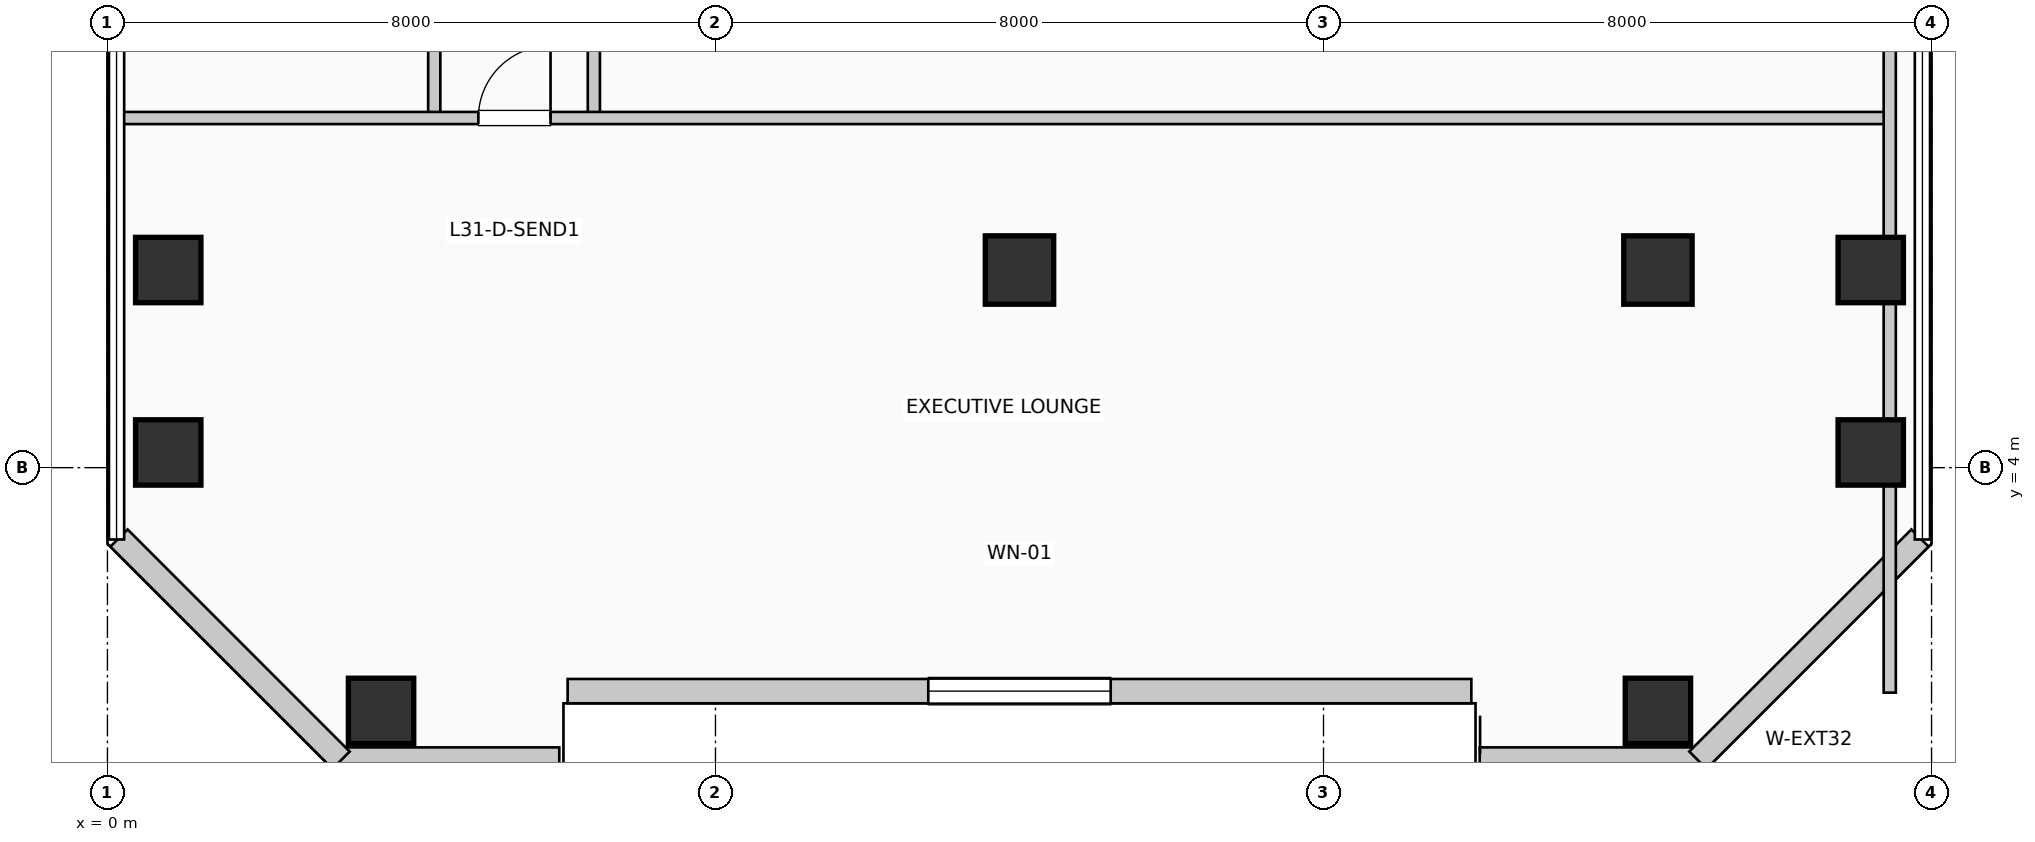
"""IFC4 building model, lengths in metres.
Left out: names, types, materials, properties, quantities, classifications, styles, units other than length and angle.
Written with IfcOpenShell. Run it as: python <this file> out.ifc"""

import sys

from ifc_helpers import new_model, si_unit, direction, frame, frame_2d, origin, origin_2d, place, context, subcontext, project, spatial, rectangle, extrude, element, fill, save


model = new_model("IFC4")
c1 = context("Model", 3, precision=1e-05, world=origin(), true_north=direction((0.0, 1.0)))
c2 = subcontext(c1, "Body", "Model", "MODEL_VIEW")
j1 = project(units=[si_unit("LENGTHUNIT", "METRE"), si_unit("PLANEANGLEUNIT", "RADIAN")], contexts=[c1])
p1 = place(None, origin())
s1 = spatial("IfcSite", under=j1, at=p1, CompositionType="ELEMENT")
p2 = place(p1, origin())
s2 = spatial("IfcBuilding", under=s1, at=p2, CompositionType="ELEMENT")
p3 = place(p2, frame((0.0, 0.0, 130.35)))
s3 = spatial("IfcBuildingStorey", under=s2, at=p3, CompositionType="ELEMENT", Elevation=130.35)
for number, where, z_axis, x_axis in (
    (1, (0.8, 4.2, 0.0), (0.0, 0.0, 1.0), (1.0, 0.0, 0.0)),
    (2, (0.8, 6.6, 0.0), (0.0, 0.0, 1.0), (1.0, 0.0, 0.0)),
    (3, (3.6, 0.8, 0.0), (0.0, 0.0, 1.0), (1.0, 0.0, 0.0)),
):
    element("IfcColumn", number, at=place(p3, frame(where, z_axis=z_axis, x_axis=x_axis)), inside=s3, PredefinedType="COLUMN", context=c2, shape_type="SweptSolid", body=[
        extrude(rectangle(XDim=0.86, YDim=0.86, at=origin_2d()), origin(), (0.0, 0.0, 1.0), 4.62),
    ])
p4 = place(p3, frame((12.0, 6.6, 0.0), z_axis=(0.0, 0.0, 1.0), x_axis=(1.0, 0.0, 0.0)))
e4 = element("IfcColumn", 4, at=p4, inside=s3, PredefinedType="COLUMN", context=c2, shape_type="SweptSolid", body=[
    extrude(rectangle(XDim=0.9, YDim=0.9, at=origin_2d()), origin(), (0.0, 0.0, 1.0), 4.62),
])
p5 = place(p3, frame((20.4, 0.8, 0.0), z_axis=(0.0, 0.0, 1.0), x_axis=(1.0, 0.0, 0.0)))
e5 = element("IfcColumn", 5, at=p5, inside=s3, PredefinedType="COLUMN", context=c2, shape_type="SweptSolid", body=[
    extrude(rectangle(XDim=0.86, YDim=0.86, at=origin_2d()), origin(), (0.0, 0.0, 1.0), 4.62),
])
p6 = place(p3, frame((20.4, 6.6, 0.0), z_axis=(0.0, 0.0, 1.0), x_axis=(1.0, 0.0, 0.0)))
e6 = element("IfcColumn", 6, at=p6, inside=s3, PredefinedType="COLUMN", context=c2, shape_type="SweptSolid", body=[
    extrude(rectangle(XDim=0.9, YDim=0.9, at=origin_2d()), origin(), (0.0, 0.0, 1.0), 4.62),
])
for number, where, z_axis, x_axis in (
    (7, (23.2, 4.2, 0.0), (0.0, 0.0, 1.0), (1.0, 0.0, 0.0)),
    (8, (23.2, 6.6, 0.0), (0.0, 0.0, 1.0), (1.0, 0.0, 0.0)),
):
    element("IfcColumn", number, at=place(p3, frame(where, z_axis=z_axis, x_axis=x_axis)), inside=s3, PredefinedType="COLUMN", context=c2, shape_type="SweptSolid", body=[
        extrude(rectangle(XDim=0.86, YDim=0.86, at=origin_2d()), origin(), (0.0, 0.0, 1.0), 4.62),
    ])
p7 = place(p3, frame((3.055, 0.16, 0.0), z_axis=(0.0, 0.0, 1.0), x_axis=(1.0, 0.0, 0.0)))
e9 = element("IfcWall", 9, at=p7, inside=s3, PredefinedType="SOLIDWALL", context=c2, shape_type="SweptSolid", body=[
    extrude(rectangle(XDim=2.89, YDim=0.32, at=frame_2d((1.445, 0.0))), origin(), (0.0, 0.0, 1.0), 4.37),
])
p8 = place(p3, frame((6.055, 1.06, 0.0), z_axis=(0.0, 0.0, 1.0), x_axis=(1.0, 0.0, 0.0)))
e10 = element("IfcWall", 10, at=p8, inside=s3, PredefinedType="SOLIDWALL", context=c2, shape_type="SweptSolid", body=[
    extrude(rectangle(XDim=11.89, YDim=0.32, at=frame_2d((5.945, 0.0))), origin(), (0.0, 0.0, 1.0), 4.37),
])
p9 = place(p8, frame((4.745, 0.0, 0.85)))
e11 = element("IfcOpeningElement", 11, at=p9, cuts=e10, PredefinedType="OPENING", context=c2, shape_type="SweptSolid", body=[
    extrude(rectangle(XDim=2.4, YDim=2.05, at=frame_2d((1.2, 1.025))), frame((0.0, 0.17, 0.0), z_axis=(0.0, -1.0, 0.0), x_axis=(1.0, 0.0, 0.0)), (0.0, 0.0, 1.0), 0.34),
])
p10 = place(p3, frame((18.055, 0.16, 0.0), z_axis=(0.0, 0.0, 1.0), x_axis=(1.0, 0.0, 0.0)))
e12 = element("IfcWall", 12, at=p10, inside=s3, PredefinedType="SOLIDWALL", context=c2, shape_type="SweptSolid", body=[
    extrude(rectangle(XDim=2.89, YDim=0.32, at=frame_2d((1.445, 0.0))), origin(), (0.0, 0.0, 1.0), 4.37),
])
for number, where, z_axis, x_axis in (
    (13, (20.926, 0.152, 0.0), (0.0, 0.0, 1.0), (0.707, 0.707, 0.0)),
    (14, (0.152, 3.074, 0.0), (0.0, 0.0, 1.0), (0.707, -0.707, 0.0)),
):
    element("IfcWall", number, at=place(p3, frame(where, z_axis=z_axis, x_axis=x_axis)), inside=s3, PredefinedType="SOLIDWALL", context=c2, shape_type="SweptSolid", body=[
        extrude(rectangle(XDim=4.133, YDim=0.32, at=frame_2d((2.066, 0.0))), origin(), (0.0, 0.0, 1.0), 4.37),
    ])
p11 = place(p3, frame((4.3, 8.6, 0.0), z_axis=(0.0, 0.0, 1.0), x_axis=(0.0, 1.0, 0.0)))
e15 = element("IfcWall", 15, at=p11, inside=s3, PredefinedType="PARTITIONING", context=c2, shape_type="SweptSolid", body=[
    extrude(rectangle(XDim=20.8, YDim=0.16, at=frame_2d((10.4, 0.0))), origin(), (0.0, 0.0, 1.0), 4.37),
])
p12 = place(p11, frame((4.011, 0.0, 0.0), z_axis=(0.0, 0.0, 1.0), x_axis=(-1.0, 0.0, 0.0)))
e16 = element("IfcOpeningElement", 16, at=p12, cuts=e15, PredefinedType="OPENING", context=c2, shape_type="SweptSolid", body=[
    extrude(rectangle(XDim=0.95, YDim=2.15, at=frame_2d((0.475, 1.075))), frame((0.0, 0.09, 0.0), z_axis=(0.0, -1.0, 0.0), x_axis=(1.0, 0.0, 0.0)), (0.0, 0.0, 1.0), 0.18),
])
p13 = place(p11, frame((11.083, 0.0, 0.0), z_axis=(0.0, 0.0, 1.0), x_axis=(-1.0, 0.0, 0.0)))
e17 = element("IfcOpeningElement", 17, at=p13, cuts=e15, PredefinedType="OPENING", context=c2, shape_type="SweptSolid", body=[
    extrude(rectangle(XDim=0.95, YDim=2.15, at=frame_2d((0.475, 1.075))), frame((0.0, 0.09, 0.0), z_axis=(0.0, -1.0, 0.0), x_axis=(1.0, 0.0, 0.0)), (0.0, 0.0, 1.0), 0.18),
])
p14 = place(p11, frame((17.947, 0.0, 0.0), z_axis=(0.0, 0.0, 1.0), x_axis=(-1.0, 0.0, 0.0)))
e18 = element("IfcOpeningElement", 18, at=p14, cuts=e15, PredefinedType="OPENING", context=c2, shape_type="SweptSolid", body=[
    extrude(rectangle(XDim=0.95, YDim=2.15, at=frame_2d((0.475, 1.075))), frame((0.0, 0.09, 0.0), z_axis=(0.0, -1.0, 0.0), x_axis=(1.0, 0.0, 0.0)), (0.0, 0.0, 1.0), 0.18),
])
p15 = place(p3, frame((6.4, 8.6, 0.0), z_axis=(0.0, 0.0, 1.0), x_axis=(0.0, 1.0, 0.0)))
e19 = element("IfcWall", 19, at=p15, inside=s3, PredefinedType="PARTITIONING", context=c2, shape_type="SweptSolid", body=[
    extrude(rectangle(XDim=20.8, YDim=0.16, at=frame_2d((10.4, 0.0))), origin(), (0.0, 0.0, 1.0), 4.37),
])
p16 = place(p15, frame((1.397, 0.0, 0.0)))
e20 = element("IfcOpeningElement", 20, at=p16, cuts=e19, PredefinedType="OPENING", context=c2, shape_type="SweptSolid", body=[
    extrude(rectangle(XDim=0.95, YDim=2.15, at=frame_2d((0.475, 1.075))), frame((0.0, 0.09, 0.0), z_axis=(0.0, -1.0, 0.0), x_axis=(1.0, 0.0, 0.0)), (0.0, 0.0, 1.0), 0.18),
])
p17 = place(p15, frame((5.349, 0.0, 0.0)))
e21 = element("IfcOpeningElement", 21, at=p17, cuts=e19, PredefinedType="OPENING", context=c2, shape_type="SweptSolid", body=[
    extrude(rectangle(XDim=0.95, YDim=2.15, at=frame_2d((0.475, 1.075))), frame((0.0, 0.09, 0.0), z_axis=(0.0, -1.0, 0.0), x_axis=(1.0, 0.0, 0.0)), (0.0, 0.0, 1.0), 0.18),
])
p18 = place(p15, frame((9.717, 0.0, 0.0)))
e22 = element("IfcOpeningElement", 22, at=p18, cuts=e19, PredefinedType="OPENING", context=c2, shape_type="SweptSolid", body=[
    extrude(rectangle(XDim=0.95, YDim=2.15, at=frame_2d((0.475, 1.075))), frame((0.0, 0.09, 0.0), z_axis=(0.0, -1.0, 0.0), x_axis=(1.0, 0.0, 0.0)), (0.0, 0.0, 1.0), 0.18),
])
p19 = place(p15, frame((14.293, 0.0, 0.0)))
e23 = element("IfcOpeningElement", 23, at=p19, cuts=e19, PredefinedType="OPENING", context=c2, shape_type="SweptSolid", body=[
    extrude(rectangle(XDim=0.95, YDim=2.15, at=frame_2d((0.475, 1.075))), frame((0.0, 0.09, 0.0), z_axis=(0.0, -1.0, 0.0), x_axis=(1.0, 0.0, 0.0)), (0.0, 0.0, 1.0), 0.18),
])
p20 = place(p15, frame((18.453, 0.0, 0.0)))
e24 = element("IfcOpeningElement", 24, at=p20, cuts=e19, PredefinedType="OPENING", context=c2, shape_type="SweptSolid", body=[
    extrude(rectangle(XDim=0.95, YDim=2.15, at=frame_2d((0.475, 1.075))), frame((0.0, 0.09, 0.0), z_axis=(0.0, -1.0, 0.0), x_axis=(1.0, 0.0, 0.0)), (0.0, 0.0, 1.0), 0.18),
])
p21 = place(p3, frame((0.19, 8.6, 0.0), z_axis=(0.0, 0.0, 1.0), x_axis=(1.0, 0.0, 0.0)))
e25 = element("IfcWall", 25, at=p21, inside=s3, PredefinedType="PARTITIONING", context=c2, shape_type="SweptSolid", body=[
    extrude(rectangle(XDim=23.26, YDim=0.16, at=frame_2d((11.63, 0.0))), origin(), (0.0, 0.0, 1.0), 4.37),
])
p22 = place(p21, frame((4.69, 0.0, 0.0)))
e26 = element("IfcOpeningElement", 26, at=p22, cuts=e25, PredefinedType="OPENING", context=c2, shape_type="SweptSolid", body=[
    extrude(rectangle(XDim=0.95, YDim=2.15, at=frame_2d((0.475, 1.075))), frame((0.0, 0.09, 0.0), z_axis=(0.0, -1.0, 0.0), x_axis=(1.0, 0.0, 0.0)), (0.0, 0.0, 1.0), 0.18),
])
p23 = place(p3, frame((23.45, 1.04, 0.0), z_axis=(0.0, 0.0, 1.0), x_axis=(0.0, 1.0, 0.0)))
e27 = element("IfcWall", 27, at=p23, inside=s3, PredefinedType="PARTITIONING", context=c2, shape_type="SweptSolid", body=[
    extrude(rectangle(XDim=28.36, YDim=0.16, at=frame_2d((14.18, 0.0))), origin(), (0.0, 0.0, 1.0), 3.705),
])
p24 = place(p9, origin())
e28 = element("IfcWindow", 28, at=p24, inside=s3, PartitioningType="SINGLE_PANEL", PredefinedType="WINDOW", context=c2, shape_type="SweptSolid", body=[
    extrude(rectangle(XDim=2.4, YDim=2.05, at=frame_2d((1.2, 1.025))), frame((0.0, 0.03, 0.0), z_axis=(0.0, -1.0, 0.0), x_axis=(1.0, 0.0, 0.0)), (0.0, 0.0, 1.0), 0.06),
])
fill(e11, e28)
p25 = place(p22, origin())
e29 = element("IfcDoor", 29, at=p25, inside=s3, OperationType="SINGLE_SWING_RIGHT", PredefinedType="DOOR", context=c2, shape_type="SweptSolid", body=[
    extrude(rectangle(XDim=0.95, YDim=2.15, at=frame_2d((0.475, 1.075))), frame((0.0, 0.025, 0.0), z_axis=(0.0, -1.0, 0.0), x_axis=(1.0, 0.0, 0.0)), (0.0, 0.0, 1.0), 0.05),
])
fill(e26, e29)
save(model, sys.argv[1])
